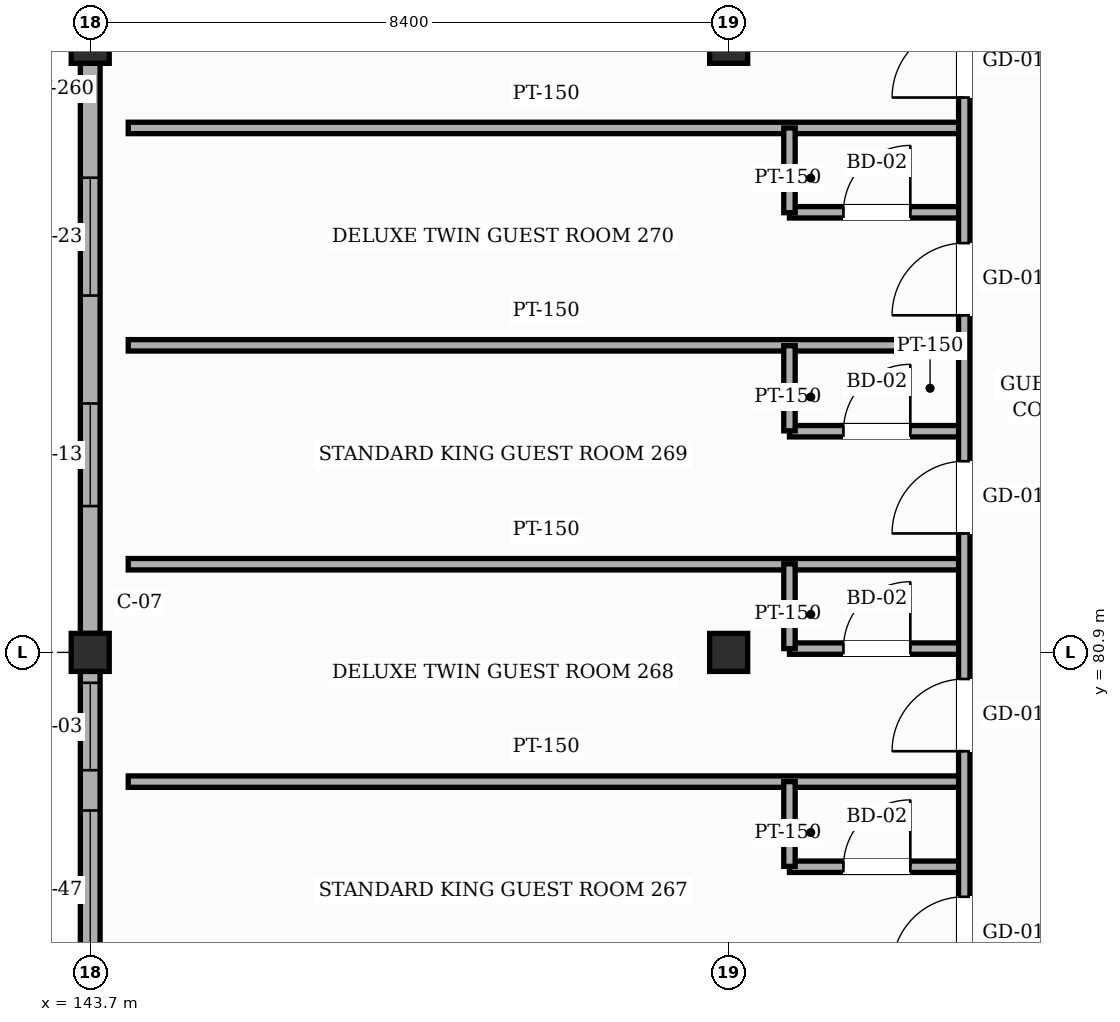
"""IFC4 building model, lengths in metres.
Left out: names, types, materials, properties, quantities, classifications, styles, units other than length and angle.
Written with IfcOpenShell. Run it as: python <this file> out.ifc"""

import sys

from ifc_helpers import new_model, si_unit, direction, frame, frame_2d, origin, origin_2d, place, context, subcontext, project, spatial, rectangle, hollow_rectangle, extrude, element, fill, save


model = new_model("IFC4")
c1 = context("Model", 3, precision=1e-05, world=origin(), true_north=direction((0.0, 1.0)))
c2 = subcontext(c1, "Body", "Model", "MODEL_VIEW")
j1 = project(units=[si_unit("LENGTHUNIT", "METRE"), si_unit("PLANEANGLEUNIT", "RADIAN")], contexts=[c1])
p1 = place(None, origin())
s1 = spatial("IfcSite", under=j1, at=p1, CompositionType="ELEMENT")
p2 = place(p1, origin())
s2 = spatial("IfcBuilding", under=s1, at=p2, CompositionType="ELEMENT")
p3 = place(p2, frame((0.0, 0.0, 39.0)))
s3 = spatial("IfcBuildingStorey", under=s2, at=p3, CompositionType="ELEMENT", Elevation=39.0)
p4 = place(p3, frame((143.7, 80.9, 0.0), z_axis=(0.0, 0.0, 1.0), x_axis=(1.0, 0.0, 0.0)))
e1 = element("IfcColumn", 1, at=p4, inside=s3, PredefinedType="COLUMN", context=c2, shape_type="SweptSolid", body=[
    extrude(hollow_rectangle(XDim=0.5, YDim=0.5, WallThickness=0.022, InnerFilletRadius=0.022, OuterFilletRadius=0.044, at=origin_2d()), origin(), (0.0, 0.0, 1.0), 3.6),
])
p5 = place(p3, frame((143.7, 88.9, 0.0), z_axis=(0.0, 0.0, 1.0), x_axis=(1.0, 0.0, 0.0)))
e2 = element("IfcColumn", 2, at=p5, inside=s3, PredefinedType="COLUMN", context=c2, shape_type="SweptSolid", body=[
    extrude(hollow_rectangle(XDim=0.5, YDim=0.5, WallThickness=0.022, InnerFilletRadius=0.022, OuterFilletRadius=0.044, at=origin_2d()), origin(), (0.0, 0.0, 1.0), 3.38),
])
p6 = place(p3, frame((152.1, 80.9, 0.0), z_axis=(0.0, 0.0, 1.0), x_axis=(1.0, 0.0, 0.0)))
e3 = element("IfcColumn", 3, at=p6, inside=s3, PredefinedType="COLUMN", context=c2, shape_type="SweptSolid", body=[
    extrude(hollow_rectangle(XDim=0.5, YDim=0.5, WallThickness=0.022, InnerFilletRadius=0.022, OuterFilletRadius=0.044, at=origin_2d()), origin(), (0.0, 0.0, 1.0), 3.6),
])
p7 = place(p3, frame((152.1, 88.9, 0.0), z_axis=(0.0, 0.0, 1.0), x_axis=(1.0, 0.0, 0.0)))
e4 = element("IfcColumn", 4, at=p7, inside=s3, PredefinedType="COLUMN", context=c2, shape_type="SweptSolid", body=[
    extrude(hollow_rectangle(XDim=0.5, YDim=0.5, WallThickness=0.022, InnerFilletRadius=0.022, OuterFilletRadius=0.044, at=origin_2d()), origin(), (0.0, 0.0, 1.0), 3.38),
])
p8 = place(p3, frame((143.7, 73.6, 0.0), z_axis=(0.0, 0.0, 1.0), x_axis=(0.0, 1.0, 0.0)))
e5 = element("IfcWall", 5, at=p8, inside=s3, PredefinedType="SOLIDWALL", context=c2, shape_type="SweptSolid", body=[
    extrude(rectangle(XDim=7.05, YDim=0.26, at=frame_2d((3.525, 0.0))), origin(), (0.0, 0.0, 1.0), 2.805),
])
p9 = place(p8, frame((0.445, 0.0, 0.85)))
e6 = element("IfcOpeningElement", 6, at=p9, cuts=e5, PredefinedType="OPENING", context=c2, shape_type="SweptSolid", body=[
    extrude(rectangle(XDim=1.85, YDim=1.5, at=frame_2d((0.925, 0.75))), frame((0.0, 0.14, 0.0), z_axis=(0.0, -1.0, 0.0), x_axis=(1.0, 0.0, 0.0)), (0.0, 0.0, 1.0), 0.28),
])
p10 = place(p8, frame((3.12, 0.0, 0.85)))
e7 = element("IfcOpeningElement", 7, at=p10, cuts=e5, PredefinedType="OPENING", context=c2, shape_type="SweptSolid", body=[
    extrude(rectangle(XDim=2.1, YDim=1.5, at=frame_2d((1.05, 0.75))), frame((0.0, 0.14, 0.0), z_axis=(0.0, -1.0, 0.0), x_axis=(1.0, 0.0, 0.0)), (0.0, 0.0, 1.0), 0.28),
])
p11 = place(p8, frame((5.75, 0.0, 0.85)))
e8 = element("IfcOpeningElement", 8, at=p11, cuts=e5, PredefinedType="OPENING", context=c2, shape_type="SweptSolid", body=[
    extrude(rectangle(XDim=1.15, YDim=1.65, at=frame_2d((0.575, 0.825))), frame((0.0, 0.14, 0.0), z_axis=(0.0, -1.0, 0.0), x_axis=(1.0, 0.0, 0.0)), (0.0, 0.0, 1.0), 0.28),
])
p12 = place(p3, frame((143.7, 81.15, 0.0), z_axis=(0.0, 0.0, 1.0), x_axis=(0.0, 1.0, 0.0)))
e9 = element("IfcWall", 9, at=p12, inside=s3, PredefinedType="SOLIDWALL", context=c2, shape_type="SweptSolid", body=[
    extrude(rectangle(XDim=7.5, YDim=0.26, at=frame_2d((3.75, 0.0))), origin(), (0.0, 0.0, 1.0), 2.805),
])
p13 = place(p12, frame((1.675, 0.0, 0.85)))
e10 = element("IfcOpeningElement", 10, at=p13, cuts=e9, PredefinedType="OPENING", context=c2, shape_type="SweptSolid", body=[
    extrude(rectangle(XDim=1.35, YDim=1.65, at=frame_2d((0.675, 0.825))), frame((0.0, 0.14, 0.0), z_axis=(0.0, -1.0, 0.0), x_axis=(1.0, 0.0, 0.0)), (0.0, 0.0, 1.0), 0.28),
])
p14 = place(p12, frame((4.445, 0.0, 0.85)))
e11 = element("IfcOpeningElement", 11, at=p14, cuts=e9, PredefinedType="OPENING", context=c2, shape_type="SweptSolid", body=[
    extrude(rectangle(XDim=1.55, YDim=1.65, at=frame_2d((0.775, 0.825))), frame((0.0, 0.14, 0.0), z_axis=(0.0, -1.0, 0.0), x_axis=(1.0, 0.0, 0.0)), (0.0, 0.0, 1.0), 0.28),
])
p15 = place(p3, frame((152.9, 78.08, 0.0), z_axis=(0.0, 0.0, 1.0), x_axis=(1.0, 0.0, 0.0)))
e12 = element("IfcWall", 12, at=p15, inside=s3, PredefinedType="PARTITIONING", context=c2, shape_type="SweptSolid", body=[
    extrude(rectangle(XDim=2.3, YDim=0.15, at=frame_2d((1.15, 0.0))), origin(), (0.0, 0.0, 1.0), 3.365),
])
p16 = place(p15, frame((0.71, 0.0, 0.0)))
e13 = element("IfcOpeningElement", 13, at=p16, cuts=e12, PredefinedType="OPENING", context=c2, shape_type="SweptSolid", body=[
    extrude(rectangle(XDim=0.88, YDim=2.12, at=frame_2d((0.44, 1.06))), frame((0.0, 0.085, 0.0), z_axis=(0.0, -1.0, 0.0), x_axis=(1.0, 0.0, 0.0)), (0.0, 0.0, 1.0), 0.17),
])
p17 = place(p3, frame((144.2, 79.2, 0.0), z_axis=(0.0, 0.0, 1.0), x_axis=(1.0, 0.0, 0.0)))
e14 = element("IfcWall", 14, at=p17, inside=s3, PredefinedType="PARTITIONING", context=c2, shape_type="SweptSolid", body=[
    extrude(rectangle(XDim=11.0, YDim=0.15, at=frame_2d((5.5, 0.0))), origin(), (0.0, 0.0, 1.0), 3.365),
])
p18 = place(p3, frame((152.9, 80.95, 0.0), z_axis=(0.0, 0.0, 1.0), x_axis=(1.0, 0.0, 0.0)))
e15 = element("IfcWall", 15, at=p18, inside=s3, PredefinedType="PARTITIONING", context=c2, shape_type="SweptSolid", body=[
    extrude(rectangle(XDim=2.3, YDim=0.15, at=frame_2d((1.15, 0.0))), origin(), (0.0, 0.0, 1.0), 2.755),
])
p19 = place(p18, frame((0.71, 0.0, 0.0)))
e16 = element("IfcOpeningElement", 16, at=p19, cuts=e15, PredefinedType="OPENING", context=c2, shape_type="SweptSolid", body=[
    extrude(rectangle(XDim=0.88, YDim=2.12, at=frame_2d((0.44, 1.06))), frame((0.0, 0.085, 0.0), z_axis=(0.0, -1.0, 0.0), x_axis=(1.0, 0.0, 0.0)), (0.0, 0.0, 1.0), 0.17),
])
p20 = place(p3, frame((144.2, 82.06, 0.0), z_axis=(0.0, 0.0, 1.0), x_axis=(1.0, 0.0, 0.0)))
e17 = element("IfcWall", 17, at=p20, inside=s3, PredefinedType="PARTITIONING", context=c2, shape_type="SweptSolid", body=[
    extrude(rectangle(XDim=11.0, YDim=0.15, at=frame_2d((5.5, 0.0))), origin(), (0.0, 0.0, 1.0), 3.365),
])
p21 = place(p3, frame((152.9, 83.81, 0.0), z_axis=(0.0, 0.0, 1.0), x_axis=(1.0, 0.0, 0.0)))
e18 = element("IfcWall", 18, at=p21, inside=s3, PredefinedType="PARTITIONING", context=c2, shape_type="SweptSolid", body=[
    extrude(rectangle(XDim=2.3, YDim=0.15, at=frame_2d((1.15, 0.0))), origin(), (0.0, 0.0, 1.0), 3.365),
])
p22 = place(p21, frame((0.71, 0.0, 0.0)))
e19 = element("IfcOpeningElement", 19, at=p22, cuts=e18, PredefinedType="OPENING", context=c2, shape_type="SweptSolid", body=[
    extrude(rectangle(XDim=0.88, YDim=2.12, at=frame_2d((0.44, 1.06))), frame((0.0, 0.085, 0.0), z_axis=(0.0, -1.0, 0.0), x_axis=(1.0, 0.0, 0.0)), (0.0, 0.0, 1.0), 0.17),
])
p23 = place(p3, frame((144.2, 84.94, 0.0), z_axis=(0.0, 0.0, 1.0), x_axis=(1.0, 0.0, 0.0)))
e20 = element("IfcWall", 20, at=p23, inside=s3, PredefinedType="PARTITIONING", context=c2, shape_type="SweptSolid", body=[
    extrude(rectangle(XDim=11.0, YDim=0.15, at=frame_2d((5.5, 0.0))), origin(), (0.0, 0.0, 1.0), 3.005),
])
p24 = place(p3, frame((152.9, 86.69, 0.0), z_axis=(0.0, 0.0, 1.0), x_axis=(1.0, 0.0, 0.0)))
e21 = element("IfcWall", 21, at=p24, inside=s3, PredefinedType="PARTITIONING", context=c2, shape_type="SweptSolid", body=[
    extrude(rectangle(XDim=2.3, YDim=0.15, at=frame_2d((1.15, 0.0))), origin(), (0.0, 0.0, 1.0), 3.365),
])
p25 = place(p24, frame((0.71, 0.0, 0.0)))
e22 = element("IfcOpeningElement", 22, at=p25, cuts=e21, PredefinedType="OPENING", context=c2, shape_type="SweptSolid", body=[
    extrude(rectangle(XDim=0.88, YDim=2.12, at=frame_2d((0.44, 1.06))), frame((0.0, 0.085, 0.0), z_axis=(0.0, -1.0, 0.0), x_axis=(1.0, 0.0, 0.0)), (0.0, 0.0, 1.0), 0.17),
])
p26 = place(p3, frame((144.2, 87.8, 0.0), z_axis=(0.0, 0.0, 1.0), x_axis=(1.0, 0.0, 0.0)))
e23 = element("IfcWall", 23, at=p26, inside=s3, PredefinedType="PARTITIONING", context=c2, shape_type="SweptSolid", body=[
    extrude(rectangle(XDim=11.0, YDim=0.15, at=frame_2d((5.5, 0.0))), origin(), (0.0, 0.0, 1.0), 3.365),
])
for number, where, z_axis, x_axis in (
    (24, (152.9, 78.085, 0.0), (0.0, 0.0, 1.0), (0.0, 1.0, 0.0)),
    (25, (152.9, 80.95, 0.0), (0.0, 0.0, 1.0), (0.0, 1.0, 0.0)),
):
    element("IfcWall", number, at=place(p3, frame(where, z_axis=z_axis, x_axis=x_axis)), inside=s3, PredefinedType="PARTITIONING", context=c2, shape_type="SweptSolid", body=[
        extrude(rectangle(XDim=1.115, YDim=0.15, at=frame_2d((0.558, 0.0))), origin(), (0.0, 0.0, 1.0), 3.365),
    ])
p27 = place(p3, frame((152.9, 83.815, 0.0), z_axis=(0.0, 0.0, 1.0), x_axis=(0.0, 1.0, 0.0)))
e26 = element("IfcWall", 26, at=p27, inside=s3, PredefinedType="PARTITIONING", context=c2, shape_type="SweptSolid", body=[
    extrude(rectangle(XDim=1.12, YDim=0.15, at=frame_2d((0.56, 0.0))), origin(), (0.0, 0.0, 1.0), 3.365),
])
p28 = place(p3, frame((152.9, 86.685, 0.0), z_axis=(0.0, 0.0, 1.0), x_axis=(0.0, 1.0, 0.0)))
e27 = element("IfcWall", 27, at=p28, inside=s3, PredefinedType="PARTITIONING", context=c2, shape_type="SweptSolid", body=[
    extrude(rectangle(XDim=1.115, YDim=0.15, at=frame_2d((0.558, 0.0))), origin(), (0.0, 0.0, 1.0), 3.365),
])
p29 = place(p3, frame((155.2, 62.0, 0.0), z_axis=(0.0, 0.0, 1.0), x_axis=(0.0, 1.0, 0.0)))
e28 = element("IfcWall", 28, at=p29, inside=s3, PredefinedType="PARTITIONING", context=c2, shape_type="SweptSolid", body=[
    extrude(rectangle(XDim=34.4, YDim=0.15, at=frame_2d((17.2, 0.0))), origin(), (0.0, 0.0, 1.0), 3.365),
])
p30 = place(p29, frame((0.325, 0.0, 0.0)))
e29 = element("IfcOpeningElement", 29, at=p30, cuts=e28, PredefinedType="OPENING", context=c2, shape_type="SweptSolid", body=[
    extrude(rectangle(XDim=1.1, YDim=2.2, at=frame_2d((0.55, 1.1))), frame((0.0, 0.085, 0.0), z_axis=(0.0, -1.0, 0.0), x_axis=(1.0, 0.0, 0.0)), (0.0, 0.0, 1.0), 0.17),
])
p31 = place(p29, frame((3.265, 0.0, 0.0)))
e30 = element("IfcOpeningElement", 30, at=p31, cuts=e28, PredefinedType="OPENING", context=c2, shape_type="SweptSolid", body=[
    extrude(rectangle(XDim=0.95, YDim=2.15, at=frame_2d((0.475, 1.075))), frame((0.0, 0.085, 0.0), z_axis=(0.0, -1.0, 0.0), x_axis=(1.0, 0.0, 0.0)), (0.0, 0.0, 1.0), 0.17),
])
p32 = place(p29, frame((6.135, 0.0, 0.0)))
e31 = element("IfcOpeningElement", 31, at=p32, cuts=e28, PredefinedType="OPENING", context=c2, shape_type="SweptSolid", body=[
    extrude(rectangle(XDim=0.95, YDim=2.15, at=frame_2d((0.475, 1.075))), frame((0.0, 0.085, 0.0), z_axis=(0.0, -1.0, 0.0), x_axis=(1.0, 0.0, 0.0)), (0.0, 0.0, 1.0), 0.17),
])
p33 = place(p29, frame((9.0, 0.0, 0.0)))
e32 = element("IfcOpeningElement", 32, at=p33, cuts=e28, PredefinedType="OPENING", context=c2, shape_type="SweptSolid", body=[
    extrude(rectangle(XDim=0.95, YDim=2.15, at=frame_2d((0.475, 1.075))), frame((0.0, 0.085, 0.0), z_axis=(0.0, -1.0, 0.0), x_axis=(1.0, 0.0, 0.0)), (0.0, 0.0, 1.0), 0.17),
])
p34 = place(p29, frame((11.865, 0.0, 0.0)))
e33 = element("IfcOpeningElement", 33, at=p34, cuts=e28, PredefinedType="OPENING", context=c2, shape_type="SweptSolid", body=[
    extrude(rectangle(XDim=0.95, YDim=2.15, at=frame_2d((0.475, 1.075))), frame((0.0, 0.085, 0.0), z_axis=(0.0, -1.0, 0.0), x_axis=(1.0, 0.0, 0.0)), (0.0, 0.0, 1.0), 0.17),
])
p35 = place(p29, frame((14.735, 0.0, 0.0)))
e34 = element("IfcOpeningElement", 34, at=p35, cuts=e28, PredefinedType="OPENING", context=c2, shape_type="SweptSolid", body=[
    extrude(rectangle(XDim=0.95, YDim=2.15, at=frame_2d((0.475, 1.075))), frame((0.0, 0.085, 0.0), z_axis=(0.0, -1.0, 0.0), x_axis=(1.0, 0.0, 0.0)), (0.0, 0.0, 1.0), 0.17),
])
p36 = place(p29, frame((17.6, 0.0, 0.0)))
e35 = element("IfcOpeningElement", 35, at=p36, cuts=e28, PredefinedType="OPENING", context=c2, shape_type="SweptSolid", body=[
    extrude(rectangle(XDim=0.95, YDim=2.15, at=frame_2d((0.475, 1.075))), frame((0.0, 0.085, 0.0), z_axis=(0.0, -1.0, 0.0), x_axis=(1.0, 0.0, 0.0)), (0.0, 0.0, 1.0), 0.17),
])
p37 = place(p29, frame((20.465, 0.0, 0.0)))
e36 = element("IfcOpeningElement", 36, at=p37, cuts=e28, PredefinedType="OPENING", context=c2, shape_type="SweptSolid", body=[
    extrude(rectangle(XDim=0.95, YDim=2.15, at=frame_2d((0.475, 1.075))), frame((0.0, 0.085, 0.0), z_axis=(0.0, -1.0, 0.0), x_axis=(1.0, 0.0, 0.0)), (0.0, 0.0, 1.0), 0.17),
])
p38 = place(p29, frame((23.335, 0.0, 0.0)))
e37 = element("IfcOpeningElement", 37, at=p38, cuts=e28, PredefinedType="OPENING", context=c2, shape_type="SweptSolid", body=[
    extrude(rectangle(XDim=0.95, YDim=2.15, at=frame_2d((0.475, 1.075))), frame((0.0, 0.085, 0.0), z_axis=(0.0, -1.0, 0.0), x_axis=(1.0, 0.0, 0.0)), (0.0, 0.0, 1.0), 0.17),
])
p39 = place(p29, frame((26.2, 0.0, 0.0)))
e38 = element("IfcOpeningElement", 38, at=p39, cuts=e28, PredefinedType="OPENING", context=c2, shape_type="SweptSolid", body=[
    extrude(rectangle(XDim=0.95, YDim=2.15, at=frame_2d((0.475, 1.075))), frame((0.0, 0.085, 0.0), z_axis=(0.0, -1.0, 0.0), x_axis=(1.0, 0.0, 0.0)), (0.0, 0.0, 1.0), 0.17),
])
p40 = place(p29, frame((29.065, 0.0, 0.0)))
e39 = element("IfcOpeningElement", 39, at=p40, cuts=e28, PredefinedType="OPENING", context=c2, shape_type="SweptSolid", body=[
    extrude(rectangle(XDim=0.95, YDim=2.15, at=frame_2d((0.475, 1.075))), frame((0.0, 0.085, 0.0), z_axis=(0.0, -1.0, 0.0), x_axis=(1.0, 0.0, 0.0)), (0.0, 0.0, 1.0), 0.17),
])
p41 = place(p29, frame((31.935, 0.0, 0.0)))
e40 = element("IfcOpeningElement", 40, at=p41, cuts=e28, PredefinedType="OPENING", context=c2, shape_type="SweptSolid", body=[
    extrude(rectangle(XDim=0.95, YDim=2.15, at=frame_2d((0.475, 1.075))), frame((0.0, 0.085, 0.0), z_axis=(0.0, -1.0, 0.0), x_axis=(1.0, 0.0, 0.0)), (0.0, 0.0, 1.0), 0.17),
])
p42 = place(p10, origin())
e41 = element("IfcWindow", 41, at=p42, inside=s3, PartitioningType="SINGLE_PANEL", PredefinedType="WINDOW", context=c2, shape_type="SweptSolid", body=[
    extrude(rectangle(XDim=2.1, YDim=1.5, at=frame_2d((1.05, 0.75))), frame((0.0, 0.03, 0.0), z_axis=(0.0, -1.0, 0.0), x_axis=(1.0, 0.0, 0.0)), (0.0, 0.0, 1.0), 0.06),
])
fill(e7, e41)
p43 = place(p11, origin())
e42 = element("IfcWindow", 42, at=p43, inside=s3, PartitioningType="SINGLE_PANEL", PredefinedType="WINDOW", context=c2, shape_type="SweptSolid", body=[
    extrude(rectangle(XDim=1.15, YDim=1.65, at=frame_2d((0.575, 0.825))), frame((0.0, 0.03, 0.0), z_axis=(0.0, -1.0, 0.0), x_axis=(1.0, 0.0, 0.0)), (0.0, 0.0, 1.0), 0.06),
])
fill(e8, e42)
p44 = place(p13, origin())
e43 = element("IfcWindow", 43, at=p44, inside=s3, PartitioningType="SINGLE_PANEL", PredefinedType="WINDOW", context=c2, shape_type="SweptSolid", body=[
    extrude(rectangle(XDim=1.35, YDim=1.65, at=frame_2d((0.675, 0.825))), frame((0.0, 0.03, 0.0), z_axis=(0.0, -1.0, 0.0), x_axis=(1.0, 0.0, 0.0)), (0.0, 0.0, 1.0), 0.06),
])
fill(e10, e43)
p45 = place(p14, origin())
e44 = element("IfcWindow", 44, at=p45, inside=s3, PartitioningType="SINGLE_PANEL", PredefinedType="WINDOW", context=c2, shape_type="SweptSolid", body=[
    extrude(rectangle(XDim=1.55, YDim=1.65, at=frame_2d((0.775, 0.825))), frame((0.0, 0.03, 0.0), z_axis=(0.0, -1.0, 0.0), x_axis=(1.0, 0.0, 0.0)), (0.0, 0.0, 1.0), 0.06),
])
fill(e11, e44)
p46 = place(p35, origin())
e45 = element("IfcDoor", 45, at=p46, inside=s3, OperationType="SINGLE_SWING_LEFT", PredefinedType="DOOR", context=c2, shape_type="SweptSolid", body=[
    extrude(rectangle(XDim=0.95, YDim=2.15, at=frame_2d((0.475, 1.075))), frame((0.0, 0.025, 0.0), z_axis=(0.0, -1.0, 0.0), x_axis=(1.0, 0.0, 0.0)), (0.0, 0.0, 1.0), 0.05),
])
fill(e34, e45)
p47 = place(p16, origin())
e46 = element("IfcDoor", 46, at=p47, inside=s3, OperationType="SINGLE_SWING_RIGHT", PredefinedType="DOOR", context=c2, shape_type="SweptSolid", body=[
    extrude(rectangle(XDim=0.88, YDim=2.12, at=frame_2d((0.44, 1.06))), frame((0.0, 0.025, 0.0), z_axis=(0.0, -1.0, 0.0), x_axis=(1.0, 0.0, 0.0)), (0.0, 0.0, 1.0), 0.05),
])
fill(e13, e46)
p48 = place(p36, origin())
e47 = element("IfcDoor", 47, at=p48, inside=s3, OperationType="SINGLE_SWING_LEFT", PredefinedType="DOOR", context=c2, shape_type="SweptSolid", body=[
    extrude(rectangle(XDim=0.95, YDim=2.15, at=frame_2d((0.475, 1.075))), frame((0.0, 0.025, 0.0), z_axis=(0.0, -1.0, 0.0), x_axis=(1.0, 0.0, 0.0)), (0.0, 0.0, 1.0), 0.05),
])
fill(e35, e47)
p49 = place(p19, origin())
e48 = element("IfcDoor", 48, at=p49, inside=s3, OperationType="SINGLE_SWING_RIGHT", PredefinedType="DOOR", context=c2, shape_type="SweptSolid", body=[
    extrude(rectangle(XDim=0.88, YDim=2.12, at=frame_2d((0.44, 1.06))), frame((0.0, 0.025, 0.0), z_axis=(0.0, -1.0, 0.0), x_axis=(1.0, 0.0, 0.0)), (0.0, 0.0, 1.0), 0.05),
])
fill(e16, e48)
p50 = place(p37, origin())
e49 = element("IfcDoor", 49, at=p50, inside=s3, OperationType="SINGLE_SWING_LEFT", PredefinedType="DOOR", context=c2, shape_type="SweptSolid", body=[
    extrude(rectangle(XDim=0.95, YDim=2.15, at=frame_2d((0.475, 1.075))), frame((0.0, 0.025, 0.0), z_axis=(0.0, -1.0, 0.0), x_axis=(1.0, 0.0, 0.0)), (0.0, 0.0, 1.0), 0.05),
])
fill(e36, e49)
p51 = place(p22, origin())
e50 = element("IfcDoor", 50, at=p51, inside=s3, OperationType="SINGLE_SWING_RIGHT", PredefinedType="DOOR", context=c2, shape_type="SweptSolid", body=[
    extrude(rectangle(XDim=0.88, YDim=2.12, at=frame_2d((0.44, 1.06))), frame((0.0, 0.025, 0.0), z_axis=(0.0, -1.0, 0.0), x_axis=(1.0, 0.0, 0.0)), (0.0, 0.0, 1.0), 0.05),
])
fill(e19, e50)
p52 = place(p38, origin())
e51 = element("IfcDoor", 51, at=p52, inside=s3, OperationType="SINGLE_SWING_LEFT", PredefinedType="DOOR", context=c2, shape_type="SweptSolid", body=[
    extrude(rectangle(XDim=0.95, YDim=2.15, at=frame_2d((0.475, 1.075))), frame((0.0, 0.025, 0.0), z_axis=(0.0, -1.0, 0.0), x_axis=(1.0, 0.0, 0.0)), (0.0, 0.0, 1.0), 0.05),
])
fill(e37, e51)
p53 = place(p25, origin())
e52 = element("IfcDoor", 52, at=p53, inside=s3, OperationType="SINGLE_SWING_RIGHT", PredefinedType="DOOR", context=c2, shape_type="SweptSolid", body=[
    extrude(rectangle(XDim=0.88, YDim=2.12, at=frame_2d((0.44, 1.06))), frame((0.0, 0.025, 0.0), z_axis=(0.0, -1.0, 0.0), x_axis=(1.0, 0.0, 0.0)), (0.0, 0.0, 1.0), 0.05),
])
fill(e22, e52)
p54 = place(p39, origin())
e53 = element("IfcDoor", 53, at=p54, inside=s3, OperationType="SINGLE_SWING_LEFT", PredefinedType="DOOR", context=c2, shape_type="SweptSolid", body=[
    extrude(rectangle(XDim=0.95, YDim=2.15, at=frame_2d((0.475, 1.075))), frame((0.0, 0.025, 0.0), z_axis=(0.0, -1.0, 0.0), x_axis=(1.0, 0.0, 0.0)), (0.0, 0.0, 1.0), 0.05),
])
fill(e38, e53)
save(model, sys.argv[1])
